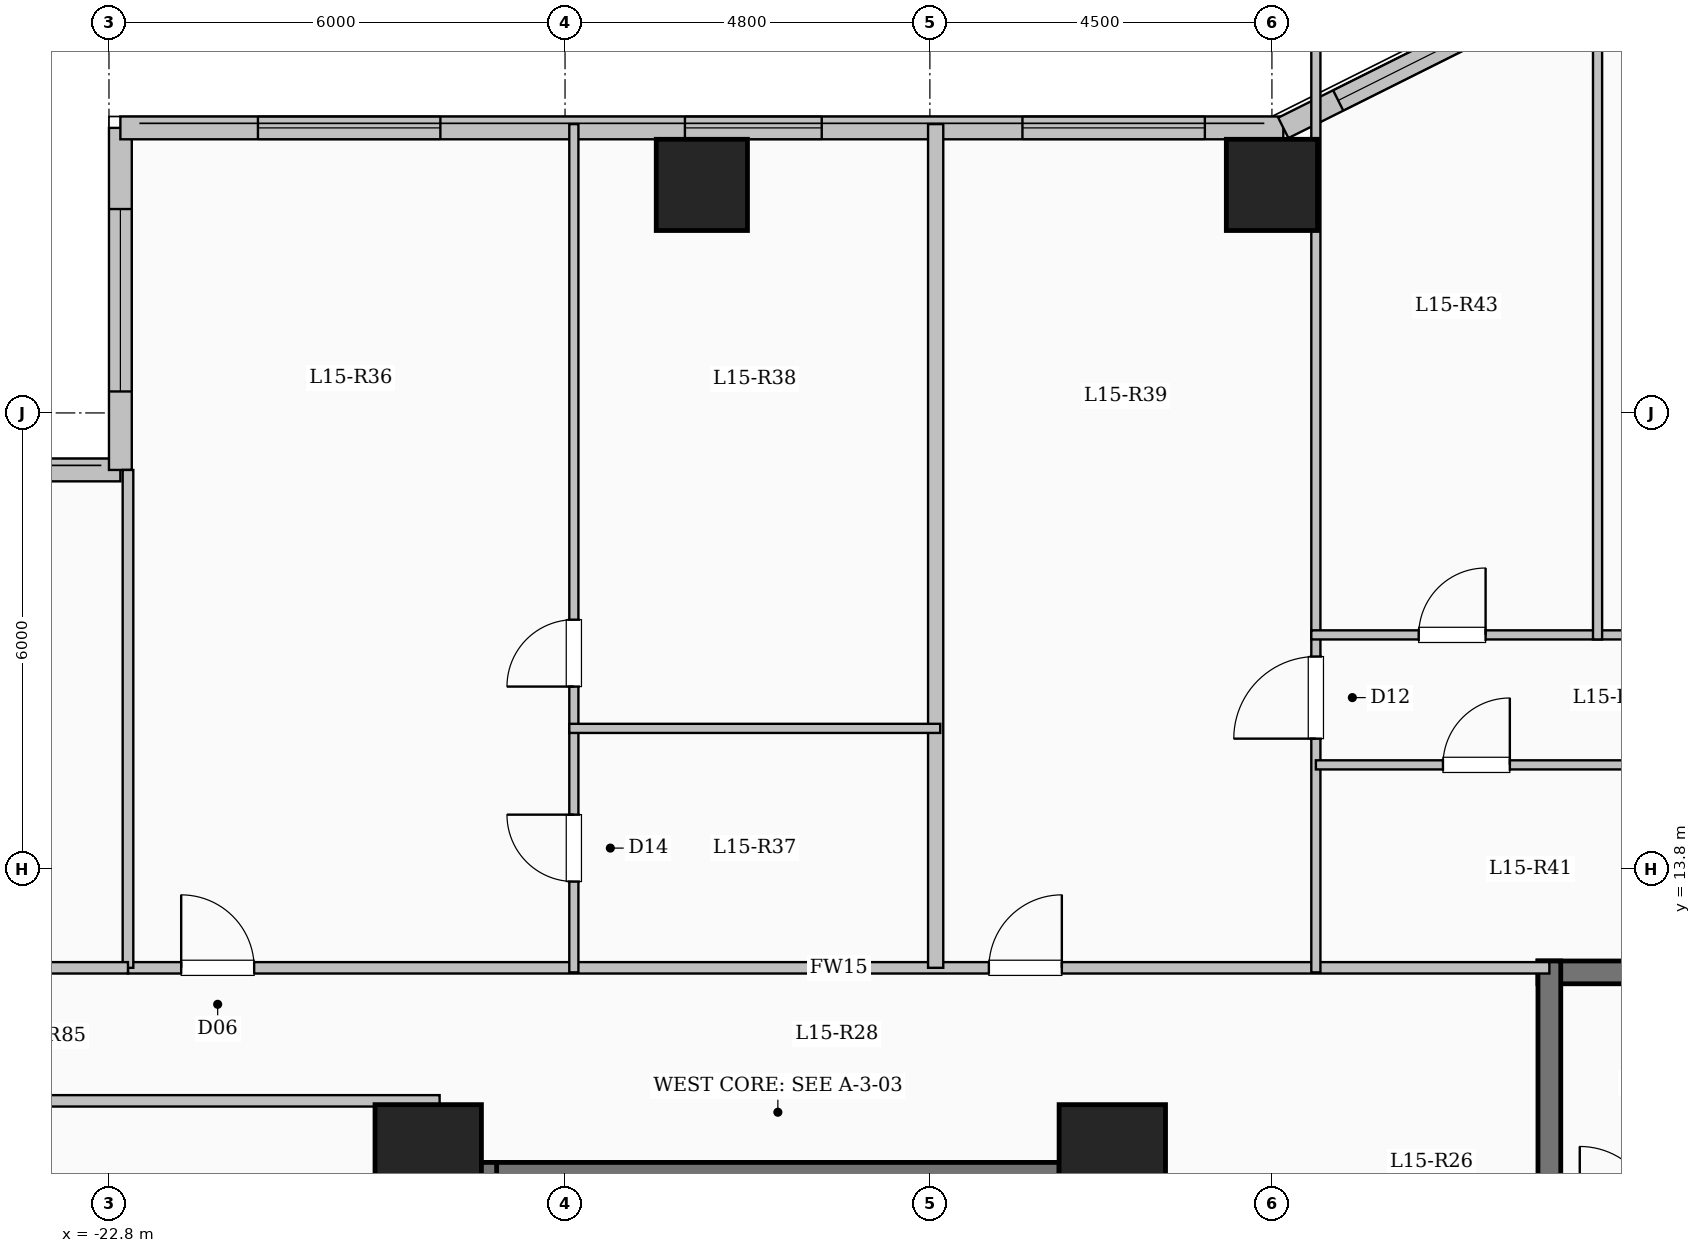
"""IFC4 building model, lengths in metres.
Left out: names, types, materials, properties, quantities, classifications, styles, units other than length and angle.
Written with IfcOpenShell. Run it as: python <this file> out.ifc"""

import sys

from ifc_helpers import new_model, si_unit, direction, frame, frame_2d, origin, origin_2d, place, context, subcontext, project, spatial, rectangle, extrude, element, fill, save


model = new_model("IFC4")
c1 = context("Model", 3, precision=1e-05, world=origin(), true_north=direction((0.0, 1.0)))
c2 = subcontext(c1, "Body", "Model", "MODEL_VIEW")
j1 = project(units=[si_unit("LENGTHUNIT", "METRE"), si_unit("PLANEANGLEUNIT", "RADIAN")], contexts=[c1])
p1 = place(None, origin())
s1 = spatial("IfcSite", under=j1, at=p1, CompositionType="ELEMENT")
p2 = place(p1, origin())
s2 = spatial("IfcBuilding", under=s1, at=p2, CompositionType="ELEMENT")
p3 = place(p2, frame((0.0, 0.0, 57.5)))
s3 = spatial("IfcBuildingStorey", under=s2, at=p3, CompositionType="ELEMENT", Elevation=57.5)
for number, where, z_axis, x_axis in (
    (1, (-9.6, 10.0, 0.0), (0.0, 0.0, 1.0), (1.0, 0.0, 0.0)),
    (2, (-18.6, 10.0, 0.0), (0.0, 0.0, 1.0), (1.0, 0.0, 0.0)),
):
    element("IfcColumn", number, at=place(p3, frame(where, z_axis=z_axis, x_axis=x_axis)), inside=s3, PredefinedType="COLUMN", context=c2, shape_type="SweptSolid", body=[
        extrude(rectangle(XDim=1.4, YDim=1.4, at=origin_2d()), origin(), (0.0, 0.0, 1.0), 3.35),
    ])
for number, where, z_axis, x_axis in (
    (3, (-15.0, 22.8, 0.0), (0.0, 0.0, 1.0), (1.0, 0.0, 0.0)),
    (4, (-7.5, 22.8, 0.0), (0.0, 0.0, 1.0), (1.0, 0.0, 0.0)),
):
    element("IfcColumn", number, at=place(p3, frame(where, z_axis=z_axis, x_axis=x_axis)), inside=s3, PredefinedType="COLUMN", context=c2, shape_type="SweptSolid", body=[
        extrude(rectangle(XDim=1.2, YDim=1.2, at=origin_2d()), origin(), (0.0, 0.0, 1.0), 3.35),
    ])
p4 = place(p3, frame((-28.65, 19.05, 0.0), z_axis=(0.0, 0.0, 1.0), x_axis=(1.0, 0.0, 0.0)))
e5 = element("IfcWall", 5, at=p4, inside=s3, PredefinedType="SOLIDWALL", context=c2, shape_type="SweptSolid", body=[
    extrude(rectangle(XDim=6.0, YDim=0.3, at=frame_2d((3.0, 0.0))), origin(), (0.0, 0.0, 1.0), 3.1),
])
p5 = place(p4, frame((2.025, 0.0, 0.9)))
e6 = element("IfcOpeningElement", 6, at=p5, cuts=e5, PredefinedType="OPENING", context=c2, shape_type="SweptSolid", body=[
    extrude(rectangle(XDim=2.0, YDim=1.7, at=frame_2d((1.0, 0.85))), frame((0.0, 0.16, 0.0), z_axis=(0.0, -1.0, 0.0), x_axis=(1.0, 0.0, 0.0)), (0.0, 0.0, 1.0), 0.32),
])
p6 = place(p3, frame((-22.65, 19.05, 0.0), z_axis=(0.0, 0.0, 1.0), x_axis=(0.0, 1.0, 0.0)))
e7 = element("IfcWall", 7, at=p6, inside=s3, PredefinedType="SOLIDWALL", context=c2, shape_type="SweptSolid", body=[
    extrude(rectangle(XDim=4.5, YDim=0.3, at=frame_2d((2.25, 0.0))), origin(), (0.0, 0.0, 1.0), 3.1),
])
p7 = place(p6, frame((1.032, 0.0, 0.9)))
e8 = element("IfcOpeningElement", 8, at=p7, cuts=e7, PredefinedType="OPENING", context=c2, shape_type="SweptSolid", body=[
    extrude(rectangle(XDim=2.4, YDim=1.8, at=frame_2d((1.2, 0.9))), frame((0.0, 0.16, 0.0), z_axis=(0.0, -1.0, 0.0), x_axis=(1.0, 0.0, 0.0)), (0.0, 0.0, 1.0), 0.32),
])
p8 = place(p3, frame((-22.65, 23.55, 0.0), z_axis=(0.0, 0.0, 1.0), x_axis=(1.0, 0.0, 0.0)))
e9 = element("IfcWall", 9, at=p8, inside=s3, PredefinedType="SOLIDWALL", context=c2, shape_type="SweptSolid", body=[
    extrude(rectangle(XDim=15.3, YDim=0.3, at=frame_2d((7.65, 0.0))), origin(), (0.0, 0.0, 1.0), 3.1),
])
p9 = place(p8, frame((1.81, 0.0, 0.9)))
e10 = element("IfcOpeningElement", 10, at=p9, cuts=e9, PredefinedType="OPENING", context=c2, shape_type="SweptSolid", body=[
    extrude(rectangle(XDim=2.4, YDim=1.8, at=frame_2d((1.2, 0.9))), frame((0.0, 0.16, 0.0), z_axis=(0.0, -1.0, 0.0), x_axis=(1.0, 0.0, 0.0)), (0.0, 0.0, 1.0), 0.32),
])
p10 = place(p8, frame((7.427, 0.0, 0.9)))
e11 = element("IfcOpeningElement", 11, at=p10, cuts=e9, PredefinedType="OPENING", context=c2, shape_type="SweptSolid", body=[
    extrude(rectangle(XDim=1.8, YDim=1.65, at=frame_2d((0.9, 0.825))), frame((0.0, 0.16, 0.0), z_axis=(0.0, -1.0, 0.0), x_axis=(1.0, 0.0, 0.0)), (0.0, 0.0, 1.0), 0.32),
])
p11 = place(p8, frame((11.868, 0.0, 0.9)))
e12 = element("IfcOpeningElement", 12, at=p11, cuts=e9, PredefinedType="OPENING", context=c2, shape_type="SweptSolid", body=[
    extrude(rectangle(XDim=2.4, YDim=1.8, at=frame_2d((1.2, 0.9))), frame((0.0, 0.16, 0.0), z_axis=(0.0, -1.0, 0.0), x_axis=(1.0, 0.0, 0.0)), (0.0, 0.0, 1.0), 0.32),
])
p12 = place(p3, frame((-7.35, 23.55, 0.0), z_axis=(0.0, 0.0, 1.0), x_axis=(0.894427191, 0.4472135955, 0.0)))
e13 = element("IfcWall", 13, at=p12, inside=s3, PredefinedType="SOLIDWALL", context=c2, shape_type="SweptSolid", body=[
    extrude(rectangle(XDim=3.354, YDim=0.3, at=frame_2d((1.677, 0.0))), origin(), (0.0, 0.0, 1.0), 3.1),
])
p13 = place(p12, frame((0.807, 0.0, 0.9)))
e14 = element("IfcOpeningElement", 14, at=p13, cuts=e13, PredefinedType="OPENING", context=c2, shape_type="SweptSolid", body=[
    extrude(rectangle(XDim=1.8, YDim=1.65, at=frame_2d((0.9, 0.825))), frame((0.0, 0.16, 0.0), z_axis=(0.0, -1.0, 0.0), x_axis=(1.0, 0.0, 0.0)), (0.0, 0.0, 1.0), 0.32),
])
p14 = place(p3, frame((-18.0, 9.79, 0.0), z_axis=(0.0, 0.0, 1.0), x_axis=(1.0, 0.0, 0.0)))
e15 = element("IfcWall", 15, at=p14, inside=s3, PredefinedType="SHEAR", context=c2, shape_type="SweptSolid", body=[
    extrude(rectangle(XDim=8.0, YDim=0.3, at=frame_2d((4.0, 0.0))), origin(), (0.0, 0.0, 1.0), 3.35),
])
for number, where, z_axis, x_axis in (
    (16, (-17.85, 6.35, 0.0), (0.0, 0.0, 1.0), (0.0, 1.0, 0.0)),
    (17, (-10.15, 6.35, 0.0), (0.0, 0.0, 1.0), (0.0, 1.0, 0.0)),
):
    element("IfcWall", number, at=place(p3, frame(where, z_axis=z_axis, x_axis=x_axis)), inside=s3, PredefinedType="SHEAR", context=c2, shape_type="SweptSolid", body=[
        extrude(rectangle(XDim=3.59, YDim=0.3, at=frame_2d((1.795, 0.0))), origin(), (0.0, 0.0, 1.0), 3.35),
    ])
p15 = place(p3, frame((-4.0, 12.44, 0.0), z_axis=(0.0, 0.0, 1.0), x_axis=(1.0, 0.0, 0.0)))
e18 = element("IfcWall", 18, at=p15, inside=s3, PredefinedType="SHEAR", context=c2, shape_type="SweptSolid", body=[
    extrude(rectangle(XDim=8.0, YDim=0.3, at=frame_2d((4.0, 0.0))), origin(), (0.0, 0.0, 1.0), 3.35),
])
p16 = place(p3, frame((-3.85, 9.0, 0.0), z_axis=(0.0, 0.0, 1.0), x_axis=(0.0, 1.0, 0.0)))
e19 = element("IfcWall", 19, at=p16, inside=s3, PredefinedType="SHEAR", context=c2, shape_type="SweptSolid", body=[
    extrude(rectangle(XDim=3.59, YDim=0.3, at=frame_2d((1.795, 0.0))), origin(), (0.0, 0.0, 1.0), 3.35),
])
p17 = place(p3, frame((-22.55, 12.5, 0.0), z_axis=(0.0, 0.0, 1.0), x_axis=(1.0, 0.0, 0.0)))
e20 = element("IfcWall", 20, at=p17, inside=s3, PredefinedType="PARTITIONING", context=c2, shape_type="SweptSolid", body=[
    extrude(rectangle(XDim=18.7, YDim=0.15, at=frame_2d((9.35, 0.0))), origin(), (0.0, 0.0, 1.0), 3.1),
])
p18 = place(p17, frame((0.7, 0.0, 0.0)))
e21 = element("IfcOpeningElement", 21, at=p18, cuts=e20, PredefinedType="OPENING", context=c2, shape_type="SweptSolid", body=[
    extrude(rectangle(XDim=0.96, YDim=2.15, at=frame_2d((0.48, 1.075))), frame((0.0, 0.085, 0.0), z_axis=(0.0, -1.0, 0.0), x_axis=(1.0, 0.0, 0.0)), (0.0, 0.0, 1.0), 0.17),
])
p19 = place(p17, frame((11.326, 0.0, 0.0)))
e22 = element("IfcOpeningElement", 22, at=p19, cuts=e20, PredefinedType="OPENING", context=c2, shape_type="SweptSolid", body=[
    extrude(rectangle(XDim=0.96, YDim=2.15, at=frame_2d((0.48, 1.075))), frame((0.0, 0.085, 0.0), z_axis=(0.0, -1.0, 0.0), x_axis=(1.0, 0.0, 0.0)), (0.0, 0.0, 1.0), 0.17),
])
p20 = place(p3, frame((-11.924, 12.5, 0.0), z_axis=(0.0, 0.0, 1.0), x_axis=(0.0, 1.0, 0.0)))
e23 = element("IfcWall", 23, at=p20, inside=s3, PredefinedType="SOLIDWALL", context=c2, shape_type="SweptSolid", body=[
    extrude(rectangle(XDim=11.1, YDim=0.2, at=frame_2d((5.55, 0.0))), origin(), (0.0, 0.0, 1.0), 3.1),
])
p21 = place(p3, frame((-16.684, 12.44, 0.0), z_axis=(0.0, 0.0, 1.0), x_axis=(0.0, 1.0, 0.0)))
e24 = element("IfcWall", 24, at=p21, inside=s3, PredefinedType="PARTITIONING", context=c2, shape_type="SweptSolid", body=[
    extrude(rectangle(XDim=3.21, YDim=0.12, at=frame_2d((1.605, 0.0))), origin(), (0.0, 0.0, 1.0), 3.1),
])
p22 = place(p21, frame((1.195, 0.0, 0.0)))
e25 = element("IfcOpeningElement", 25, at=p22, cuts=e24, PredefinedType="OPENING", context=c2, shape_type="SweptSolid", body=[
    extrude(rectangle(XDim=0.88, YDim=2.1, at=frame_2d((0.44, 1.05))), frame((0.0, 0.07, 0.0), z_axis=(0.0, -1.0, 0.0), x_axis=(1.0, 0.0, 0.0)), (0.0, 0.0, 1.0), 0.14),
])
p23 = place(p3, frame((-16.684, 15.65, 0.0), z_axis=(0.0, 0.0, 1.0), x_axis=(0.0, 1.0, 0.0)))
e26 = element("IfcWall", 26, at=p23, inside=s3, PredefinedType="PARTITIONING", context=c2, shape_type="SweptSolid", body=[
    extrude(rectangle(XDim=7.95, YDim=0.12, at=frame_2d((3.975, 0.0))), origin(), (0.0, 0.0, 1.0), 3.1),
])
p24 = place(p23, frame((0.55, 0.0, 0.0)))
e27 = element("IfcOpeningElement", 27, at=p24, cuts=e26, PredefinedType="OPENING", context=c2, shape_type="SweptSolid", body=[
    extrude(rectangle(XDim=0.88, YDim=2.1, at=frame_2d((0.44, 1.05))), frame((0.0, 0.07, 0.0), z_axis=(0.0, -1.0, 0.0), x_axis=(1.0, 0.0, 0.0)), (0.0, 0.0, 1.0), 0.14),
])
p25 = place(p3, frame((-16.744, 15.65, 0.0), z_axis=(0.0, 0.0, 1.0), x_axis=(1.0, 0.0, 0.0)))
e28 = element("IfcWall", 28, at=p25, inside=s3, PredefinedType="PARTITIONING", context=c2, shape_type="SweptSolid", body=[
    extrude(rectangle(XDim=4.88, YDim=0.12, at=frame_2d((2.44, 0.0))), origin(), (0.0, 0.0, 1.0), 3.1),
])
p26 = place(p3, frame((-6.922, 12.44, 0.0), z_axis=(0.0, 0.0, 1.0), x_axis=(0.0, 1.0, 0.0)))
e29 = element("IfcWall", 29, at=p26, inside=s3, PredefinedType="PARTITIONING", context=c2, shape_type="SweptSolid", body=[
    extrude(rectangle(XDim=12.166, YDim=0.12, at=frame_2d((6.083, 0.0))), origin(), (0.0, 0.0, 1.0), 3.1),
])
p27 = place(p26, frame((3.075, 0.0, 0.0)))
e30 = element("IfcOpeningElement", 30, at=p27, cuts=e29, PredefinedType="OPENING", context=c2, shape_type="SweptSolid", body=[
    extrude(rectangle(XDim=1.08, YDim=2.15, at=frame_2d((0.54, 1.075))), frame((0.0, 0.07, 0.0), z_axis=(0.0, -1.0, 0.0), x_axis=(1.0, 0.0, 0.0)), (0.0, 0.0, 1.0), 0.14),
])
p28 = place(p3, frame((-6.922, 15.17, 0.0), z_axis=(0.0, 0.0, 1.0), x_axis=(1.0, 0.0, 0.0)))
e31 = element("IfcWall", 31, at=p28, inside=s3, PredefinedType="PARTITIONING", context=c2, shape_type="SweptSolid", body=[
    extrude(rectangle(XDim=4.225, YDim=0.12, at=frame_2d((2.113, 0.0))), origin(), (0.0, 0.0, 1.0), 3.1),
])
p29 = place(p28, frame((1.672, 0.0, 0.0)))
e32 = element("IfcOpeningElement", 32, at=p29, cuts=e31, PredefinedType="OPENING", context=c2, shape_type="SweptSolid", body=[
    extrude(rectangle(XDim=0.88, YDim=2.1, at=frame_2d((0.44, 1.05))), frame((0.0, 0.07, 0.0), z_axis=(0.0, -1.0, 0.0), x_axis=(1.0, 0.0, 0.0)), (0.0, 0.0, 1.0), 0.14),
])
p30 = place(p3, frame((-6.982, 16.88, 0.0), z_axis=(0.0, 0.0, 1.0), x_axis=(1.0, 0.0, 0.0)))
e33 = element("IfcWall", 33, at=p30, inside=s3, PredefinedType="PARTITIONING", context=c2, shape_type="SweptSolid", body=[
    extrude(rectangle(XDim=7.592, YDim=0.12, at=frame_2d((3.796, 0.0))), origin(), (0.0, 0.0, 1.0), 3.1),
])
p31 = place(p30, frame((1.413, 0.0, 0.0)))
e34 = element("IfcOpeningElement", 34, at=p31, cuts=e33, PredefinedType="OPENING", context=c2, shape_type="SweptSolid", body=[
    extrude(rectangle(XDim=0.88, YDim=2.1, at=frame_2d((0.44, 1.05))), frame((0.0, 0.07, 0.0), z_axis=(0.0, -1.0, 0.0), x_axis=(1.0, 0.0, 0.0)), (0.0, 0.0, 1.0), 0.14),
])
p32 = place(p30, frame((5.119, 0.0, 0.0)))
e35 = element("IfcOpeningElement", 35, at=p32, cuts=e33, PredefinedType="OPENING", context=c2, shape_type="SweptSolid", body=[
    extrude(rectangle(XDim=0.88, YDim=2.1, at=frame_2d((0.44, 1.05))), frame((0.0, 0.07, 0.0), z_axis=(0.0, -1.0, 0.0), x_axis=(1.0, 0.0, 0.0)), (0.0, 0.0, 1.0), 0.14),
])
p33 = place(p3, frame((-3.216, 16.82, 0.0), z_axis=(0.0, 0.0, 1.0), x_axis=(0.0, 1.0, 0.0)))
e36 = element("IfcWall", 36, at=p33, inside=s3, PredefinedType="PARTITIONING", context=c2, shape_type="SweptSolid", body=[
    extrude(rectangle(XDim=8.26, YDim=0.12, at=frame_2d((4.13, 0.0))), origin(), (0.0, 0.0, 1.0), 3.1),
])
p34 = place(p3, frame((-28.68, 10.75, 0.0), z_axis=(0.0, 0.0, 1.0), x_axis=(1.0, 0.0, 0.0)))
e37 = element("IfcWall", 37, at=p34, inside=s3, PredefinedType="PARTITIONING", context=c2, shape_type="SweptSolid", body=[
    extrude(rectangle(XDim=10.23, YDim=0.15, at=frame_2d((5.115, 0.0))), origin(), (0.0, 0.0, 1.0), 3.1),
])
p35 = place(p3, frame((-22.55, 12.5, 0.0), z_axis=(0.0, 0.0, 1.0), x_axis=(0.0, 1.0, 0.0)))
e38 = element("IfcWall", 38, at=p35, inside=s3, PredefinedType="PARTITIONING", context=c2, shape_type="SweptSolid", body=[
    extrude(rectangle(XDim=6.55, YDim=0.14, at=frame_2d((3.275, 0.0))), origin(), (0.0, 0.0, 1.0), 3.1),
])
p36 = place(p3, frame((-28.68, 12.5, 0.0), z_axis=(0.0, 0.0, 1.0), x_axis=(1.0, 0.0, 0.0)))
e39 = element("IfcWall", 39, at=p36, inside=s3, PredefinedType="PARTITIONING", context=c2, shape_type="SweptSolid", body=[
    extrude(rectangle(XDim=6.13, YDim=0.15, at=frame_2d((3.065, 0.0))), origin(), (0.0, 0.0, 1.0), 3.1),
])
p37 = place(p36, frame((2.59, 0.0, 0.0)))
e40 = element("IfcOpeningElement", 40, at=p37, cuts=e39, PredefinedType="OPENING", context=c2, shape_type="SweptSolid", body=[
    extrude(rectangle(XDim=0.95, YDim=2.15, at=frame_2d((0.475, 1.075))), frame((0.0, 0.085, 0.0), z_axis=(0.0, -1.0, 0.0), x_axis=(1.0, 0.0, 0.0)), (0.0, 0.0, 1.0), 0.17),
])
p38 = place(p7, origin())
e41 = element("IfcWindow", 41, at=p38, inside=s3, PartitioningType="SINGLE_PANEL", PredefinedType="WINDOW", context=c2, shape_type="SweptSolid", body=[
    extrude(rectangle(XDim=2.4, YDim=1.8, at=frame_2d((1.2, 0.9))), frame((0.0, 0.03, 0.0), z_axis=(0.0, -1.0, 0.0), x_axis=(1.0, 0.0, 0.0)), (0.0, 0.0, 1.0), 0.06),
])
fill(e8, e41)
p39 = place(p9, origin())
e42 = element("IfcWindow", 42, at=p39, inside=s3, PartitioningType="SINGLE_PANEL", PredefinedType="WINDOW", context=c2, shape_type="SweptSolid", body=[
    extrude(rectangle(XDim=2.4, YDim=1.8, at=frame_2d((1.2, 0.9))), frame((0.0, 0.03, 0.0), z_axis=(0.0, -1.0, 0.0), x_axis=(1.0, 0.0, 0.0)), (0.0, 0.0, 1.0), 0.06),
])
fill(e10, e42)
p40 = place(p10, origin())
e43 = element("IfcWindow", 43, at=p40, inside=s3, PartitioningType="SINGLE_PANEL", PredefinedType="WINDOW", context=c2, shape_type="SweptSolid", body=[
    extrude(rectangle(XDim=1.8, YDim=1.65, at=frame_2d((0.9, 0.825))), frame((0.0, 0.03, 0.0), z_axis=(0.0, -1.0, 0.0), x_axis=(1.0, 0.0, 0.0)), (0.0, 0.0, 1.0), 0.06),
])
fill(e11, e43)
p41 = place(p11, origin())
e44 = element("IfcWindow", 44, at=p41, inside=s3, PartitioningType="SINGLE_PANEL", PredefinedType="WINDOW", context=c2, shape_type="SweptSolid", body=[
    extrude(rectangle(XDim=2.4, YDim=1.8, at=frame_2d((1.2, 0.9))), frame((0.0, 0.03, 0.0), z_axis=(0.0, -1.0, 0.0), x_axis=(1.0, 0.0, 0.0)), (0.0, 0.0, 1.0), 0.06),
])
fill(e12, e44)
p42 = place(p13, origin())
e45 = element("IfcWindow", 45, at=p42, inside=s3, PartitioningType="SINGLE_PANEL", PredefinedType="WINDOW", context=c2, shape_type="SweptSolid", body=[
    extrude(rectangle(XDim=1.8, YDim=1.65, at=frame_2d((0.9, 0.825))), frame((0.0, 0.03, 0.0), z_axis=(0.0, -1.0, 0.0), x_axis=(1.0, 0.0, 0.0)), (0.0, 0.0, 1.0), 0.06),
])
fill(e14, e45)
p43 = place(p18, origin())
e46 = element("IfcDoor", 46, at=p43, inside=s3, OperationType="SINGLE_SWING_LEFT", PredefinedType="DOOR", context=c2, shape_type="SweptSolid", body=[
    extrude(rectangle(XDim=0.96, YDim=2.15, at=frame_2d((0.48, 1.075))), frame((0.0, 0.025, 0.0), z_axis=(0.0, -1.0, 0.0), x_axis=(1.0, 0.0, 0.0)), (0.0, 0.0, 1.0), 0.05),
])
fill(e21, e46)
p44 = place(p22, origin())
e47 = element("IfcDoor", 47, at=p44, inside=s3, OperationType="SINGLE_SWING_RIGHT", PredefinedType="DOOR", context=c2, shape_type="SweptSolid", body=[
    extrude(rectangle(XDim=0.88, YDim=2.1, at=frame_2d((0.44, 1.05))), frame((0.0, 0.025, 0.0), z_axis=(0.0, -1.0, 0.0), x_axis=(1.0, 0.0, 0.0)), (0.0, 0.0, 1.0), 0.05),
])
fill(e25, e47)
p45 = place(p24, origin())
e48 = element("IfcDoor", 48, at=p45, inside=s3, OperationType="SINGLE_SWING_LEFT", PredefinedType="DOOR", context=c2, shape_type="SweptSolid", body=[
    extrude(rectangle(XDim=0.88, YDim=2.1, at=frame_2d((0.44, 1.05))), frame((0.0, 0.025, 0.0), z_axis=(0.0, -1.0, 0.0), x_axis=(1.0, 0.0, 0.0)), (0.0, 0.0, 1.0), 0.05),
])
fill(e27, e48)
p46 = place(p19, origin())
e49 = element("IfcDoor", 49, at=p46, inside=s3, OperationType="SINGLE_SWING_RIGHT", PredefinedType="DOOR", context=c2, shape_type="SweptSolid", body=[
    extrude(rectangle(XDim=0.96, YDim=2.15, at=frame_2d((0.48, 1.075))), frame((0.0, 0.025, 0.0), z_axis=(0.0, -1.0, 0.0), x_axis=(1.0, 0.0, 0.0)), (0.0, 0.0, 1.0), 0.05),
])
fill(e22, e49)
p47 = place(p27, origin())
e50 = element("IfcDoor", 50, at=p47, inside=s3, OperationType="SINGLE_SWING_LEFT", PredefinedType="DOOR", context=c2, shape_type="SweptSolid", body=[
    extrude(rectangle(XDim=1.08, YDim=2.15, at=frame_2d((0.54, 1.075))), frame((0.0, 0.025, 0.0), z_axis=(0.0, -1.0, 0.0), x_axis=(1.0, 0.0, 0.0)), (0.0, 0.0, 1.0), 0.05),
])
fill(e30, e50)
p48 = place(p29, origin())
e51 = element("IfcDoor", 51, at=p48, inside=s3, OperationType="SINGLE_SWING_RIGHT", PredefinedType="DOOR", context=c2, shape_type="SweptSolid", body=[
    extrude(rectangle(XDim=0.88, YDim=2.1, at=frame_2d((0.44, 1.05))), frame((0.0, 0.025, 0.0), z_axis=(0.0, -1.0, 0.0), x_axis=(1.0, 0.0, 0.0)), (0.0, 0.0, 1.0), 0.05),
])
fill(e32, e51)
p49 = place(p31, origin())
e52 = element("IfcDoor", 52, at=p49, inside=s3, OperationType="SINGLE_SWING_RIGHT", PredefinedType="DOOR", context=c2, shape_type="SweptSolid", body=[
    extrude(rectangle(XDim=0.88, YDim=2.1, at=frame_2d((0.44, 1.05))), frame((0.0, 0.025, 0.0), z_axis=(0.0, -1.0, 0.0), x_axis=(1.0, 0.0, 0.0)), (0.0, 0.0, 1.0), 0.05),
])
fill(e34, e52)
save(model, sys.argv[1])
